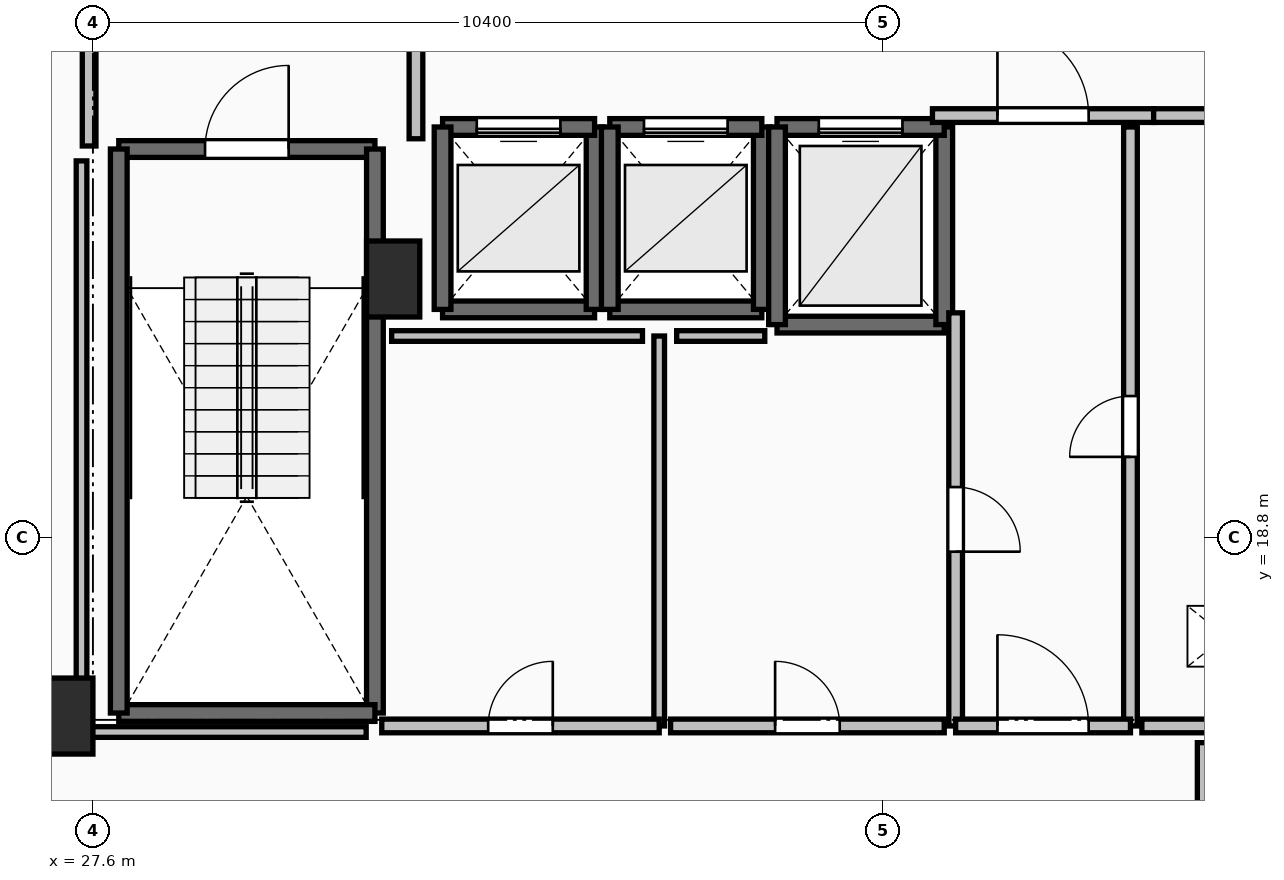
"""IFC4 building model, lengths in metres.
Left out: names, types, materials, properties, quantities, classifications, styles, units other than length and angle.
Written with IfcOpenShell. Run it as: python <this file> out.ifc"""

import sys

from ifc_helpers import new_model, si_unit, direction, frame, frame_2d, origin, origin_2d, place, context, subcontext, project, spatial, rectangle, extrude, element, fill, save


model = new_model("IFC4")
c1 = context("Model", 3, precision=1e-05, world=origin(), true_north=direction((0.0, 1.0)))
c2 = subcontext(c1, "Body", "Model", "MODEL_VIEW")
j1 = project(units=[si_unit("LENGTHUNIT", "METRE"), si_unit("PLANEANGLEUNIT", "RADIAN")], contexts=[c1])
p1 = place(None, origin())
s1 = spatial("IfcSite", under=j1, at=p1, CompositionType="ELEMENT")
p2 = place(p1, origin())
s2 = spatial("IfcBuilding", under=s1, at=p2, CompositionType="ELEMENT")
p3 = place(p2, frame((0.0, 0.0, 200.1)))
s3 = spatial("IfcBuildingStorey", under=s2, at=p3, CompositionType="ELEMENT", Elevation=200.1)
for number, where, z_axis, x_axis in (
    (1, (27.25, 16.45, 0.0), (0.0, 0.0, 1.0), (1.0, 0.0, 0.0)),
    (2, (31.55, 22.2, 0.0), (0.0, 0.0, 1.0), (1.0, 0.0, 0.0)),
):
    element("IfcColumn", number, at=place(p3, frame(where, z_axis=z_axis, x_axis=x_axis)), inside=s3, PredefinedType="PILASTER", context=c2, shape_type="SweptSolid", body=[
        extrude(rectangle(XDim=0.7, YDim=1.0, at=origin_2d()), origin(), (0.0, 0.0, 1.0), 3.55),
    ])
p4 = place(p3, frame((27.94, 23.91, 0.0), z_axis=(0.0, 0.0, 1.0), x_axis=(1.0, 0.0, 0.0)))
e3 = element("IfcWall", 3, at=p4, inside=s3, PredefinedType="SOLIDWALL", context=c2, shape_type="SweptSolid", body=[
    extrude(rectangle(XDim=3.37, YDim=0.22, at=frame_2d((1.685, 0.0))), origin(), (0.0, 0.0, 1.0), 3.29),
])
p5 = place(p4, frame((1.135, 0.0, 0.0)))
e4 = element("IfcOpeningElement", 4, at=p5, cuts=e3, PredefinedType="OPENING", context=c2, shape_type="SweptSolid", body=[
    extrude(rectangle(XDim=1.1, YDim=2.15, at=frame_2d((0.55, 1.075))), frame((0.0, 0.125, 0.0), z_axis=(0.0, -1.0, 0.0), x_axis=(1.0, 0.0, 0.0)), (0.0, 0.0, 1.0), 0.25),
])
p6 = place(p3, frame((31.31, 23.91, 0.0), z_axis=(0.0, 0.0, 1.0), x_axis=(0.0, -1.0, 0.0)))
e5 = element("IfcWall", 5, at=p6, inside=s3, PredefinedType="SOLIDWALL", context=c2, shape_type="SweptSolid", body=[
    extrude(rectangle(XDim=7.42, YDim=0.22, at=frame_2d((3.71, 0.0))), origin(), (0.0, 0.0, 1.0), 3.29),
])
p7 = place(p3, frame((31.31, 16.49, 0.0), z_axis=(0.0, 0.0, 1.0), x_axis=(-1.0, 0.0, 0.0)))
e6 = element("IfcWall", 6, at=p7, inside=s3, PredefinedType="SOLIDWALL", context=c2, shape_type="SweptSolid", body=[
    extrude(rectangle(XDim=3.37, YDim=0.22, at=frame_2d((1.685, 0.0))), origin(), (0.0, 0.0, 1.0), 3.29),
])
p8 = place(p3, frame((27.94, 16.49, 0.0), z_axis=(0.0, 0.0, 1.0), x_axis=(0.0, 1.0, 0.0)))
e7 = element("IfcWall", 7, at=p8, inside=s3, PredefinedType="SOLIDWALL", context=c2, shape_type="SweptSolid", body=[
    extrude(rectangle(XDim=7.42, YDim=0.22, at=frame_2d((3.71, 0.0))), origin(), (0.0, 0.0, 1.0), 3.29),
])
p9 = place(p3, frame((32.2, 21.8, 0.0), z_axis=(0.0, 0.0, 1.0), x_axis=(1.0, 0.0, 0.0)))
e8 = element("IfcWall", 8, at=p9, inside=s3, PredefinedType="SOLIDWALL", context=c2, shape_type="SweptSolid", body=[
    extrude(rectangle(XDim=2.0, YDim=0.22, at=frame_2d((1.0, 0.0))), origin(), (0.0, 0.0, 1.0), 3.29),
])
p10 = place(p3, frame((34.2, 21.8, 0.0), z_axis=(0.0, 0.0, 1.0), x_axis=(0.0, 1.0, 0.0)))
e9 = element("IfcWall", 9, at=p10, inside=s3, PredefinedType="SOLIDWALL", context=c2, shape_type="SweptSolid", body=[
    extrude(rectangle(XDim=2.4, YDim=0.22, at=frame_2d((1.2, 0.0))), origin(), (0.0, 0.0, 1.0), 3.29),
])
p11 = place(p3, frame((34.2, 24.2, 0.0), z_axis=(0.0, 0.0, 1.0), x_axis=(-1.0, 0.0, 0.0)))
e10 = element("IfcWall", 10, at=p11, inside=s3, PredefinedType="SOLIDWALL", context=c2, shape_type="SweptSolid", body=[
    extrude(rectangle(XDim=2.0, YDim=0.22, at=frame_2d((1.0, 0.0))), origin(), (0.0, 0.0, 1.0), 3.29),
])
p12 = place(p11, frame((0.45, 0.0, 0.0)))
e11 = element("IfcOpeningElement", 11, at=p12, cuts=e10, PredefinedType="OPENING", context=c2, shape_type="SweptSolid", body=[
    extrude(rectangle(XDim=1.1, YDim=2.2, at=frame_2d((0.55, 1.1))), frame((0.0, 0.125, 0.0), z_axis=(0.0, -1.0, 0.0), x_axis=(1.0, 0.0, 0.0)), (0.0, 0.0, 1.0), 0.25),
])
p13 = place(p3, frame((32.2, 24.2, 0.0), z_axis=(0.0, 0.0, 1.0), x_axis=(0.0, -1.0, 0.0)))
e12 = element("IfcWall", 12, at=p13, inside=s3, PredefinedType="SOLIDWALL", context=c2, shape_type="SweptSolid", body=[
    extrude(rectangle(XDim=2.4, YDim=0.22, at=frame_2d((1.2, 0.0))), origin(), (0.0, 0.0, 1.0), 3.29),
])
p14 = place(p3, frame((34.4, 21.8, 0.0), z_axis=(0.0, 0.0, 1.0), x_axis=(1.0, 0.0, 0.0)))
e13 = element("IfcWall", 13, at=p14, inside=s3, PredefinedType="SOLIDWALL", context=c2, shape_type="SweptSolid", body=[
    extrude(rectangle(XDim=2.0, YDim=0.22, at=frame_2d((1.0, 0.0))), origin(), (0.0, 0.0, 1.0), 3.29),
])
p15 = place(p3, frame((36.4, 21.8, 0.0), z_axis=(0.0, 0.0, 1.0), x_axis=(0.0, 1.0, 0.0)))
e14 = element("IfcWall", 14, at=p15, inside=s3, PredefinedType="SOLIDWALL", context=c2, shape_type="SweptSolid", body=[
    extrude(rectangle(XDim=2.4, YDim=0.22, at=frame_2d((1.2, 0.0))), origin(), (0.0, 0.0, 1.0), 3.29),
])
p16 = place(p3, frame((36.4, 24.2, 0.0), z_axis=(0.0, 0.0, 1.0), x_axis=(-1.0, 0.0, 0.0)))
e15 = element("IfcWall", 15, at=p16, inside=s3, PredefinedType="SOLIDWALL", context=c2, shape_type="SweptSolid", body=[
    extrude(rectangle(XDim=2.0, YDim=0.22, at=frame_2d((1.0, 0.0))), origin(), (0.0, 0.0, 1.0), 3.29),
])
p17 = place(p16, frame((0.45, 0.0, 0.0)))
e16 = element("IfcOpeningElement", 16, at=p17, cuts=e15, PredefinedType="OPENING", context=c2, shape_type="SweptSolid", body=[
    extrude(rectangle(XDim=1.1, YDim=2.2, at=frame_2d((0.55, 1.1))), frame((0.0, 0.125, 0.0), z_axis=(0.0, -1.0, 0.0), x_axis=(1.0, 0.0, 0.0)), (0.0, 0.0, 1.0), 0.25),
])
p18 = place(p3, frame((34.4, 24.2, 0.0), z_axis=(0.0, 0.0, 1.0), x_axis=(0.0, -1.0, 0.0)))
e17 = element("IfcWall", 17, at=p18, inside=s3, PredefinedType="SOLIDWALL", context=c2, shape_type="SweptSolid", body=[
    extrude(rectangle(XDim=2.4, YDim=0.22, at=frame_2d((1.2, 0.0))), origin(), (0.0, 0.0, 1.0), 3.29),
])
p19 = place(p3, frame((36.6, 21.6, 0.0), z_axis=(0.0, 0.0, 1.0), x_axis=(1.0, 0.0, 0.0)))
e18 = element("IfcWall", 18, at=p19, inside=s3, PredefinedType="SOLIDWALL", context=c2, shape_type="SweptSolid", body=[
    extrude(rectangle(XDim=2.2, YDim=0.22, at=frame_2d((1.1, 0.0))), origin(), (0.0, 0.0, 1.0), 3.29),
])
p20 = place(p3, frame((38.8, 21.6, 0.0), z_axis=(0.0, 0.0, 1.0), x_axis=(0.0, 1.0, 0.0)))
e19 = element("IfcWall", 19, at=p20, inside=s3, PredefinedType="SOLIDWALL", context=c2, shape_type="SweptSolid", body=[
    extrude(rectangle(XDim=2.6, YDim=0.22, at=frame_2d((1.3, 0.0))), origin(), (0.0, 0.0, 1.0), 3.29),
])
p21 = place(p3, frame((38.8, 24.2, 0.0), z_axis=(0.0, 0.0, 1.0), x_axis=(-1.0, 0.0, 0.0)))
e20 = element("IfcWall", 20, at=p21, inside=s3, PredefinedType="SOLIDWALL", context=c2, shape_type="SweptSolid", body=[
    extrude(rectangle(XDim=2.2, YDim=0.22, at=frame_2d((1.1, 0.0))), origin(), (0.0, 0.0, 1.0), 3.29),
])
p22 = place(p21, frame((0.55, 0.0, 0.0)))
e21 = element("IfcOpeningElement", 21, at=p22, cuts=e20, PredefinedType="OPENING", context=c2, shape_type="SweptSolid", body=[
    extrude(rectangle(XDim=1.1, YDim=2.2, at=frame_2d((0.55, 1.1))), frame((0.0, 0.125, 0.0), z_axis=(0.0, -1.0, 0.0), x_axis=(1.0, 0.0, 0.0)), (0.0, 0.0, 1.0), 0.25),
])
p23 = place(p3, frame((36.6, 24.2, 0.0), z_axis=(0.0, 0.0, 1.0), x_axis=(0.0, -1.0, 0.0)))
e22 = element("IfcWall", 22, at=p23, inside=s3, PredefinedType="SOLIDWALL", context=c2, shape_type="SweptSolid", body=[
    extrude(rectangle(XDim=2.6, YDim=0.22, at=frame_2d((1.3, 0.0))), origin(), (0.0, 0.0, 1.0), 3.29),
])
p24 = place(p3, frame((31.85, 24.045, 0.0), z_axis=(0.0, 0.0, 1.0), x_axis=(0.0, 1.0, 0.0)))
e23 = element("IfcWall", 23, at=p24, inside=s3, PredefinedType="PARTITIONING", context=c2, shape_type="SweptSolid", body=[
    extrude(rectangle(XDim=3.91, YDim=0.18, at=frame_2d((1.955, 0.0))), origin(), (0.0, 0.0, 1.0), 3.29),
])
p25 = place(p24, frame((1.355, 0.0, 0.0)))
e24 = element("IfcOpeningElement", 24, at=p25, cuts=e23, PredefinedType="OPENING", context=c2, shape_type="SweptSolid", body=[
    extrude(rectangle(XDim=1.2, YDim=2.15, at=frame_2d((0.6, 1.075))), frame((0.0, 0.105, 0.0), z_axis=(0.0, -1.0, 0.0), x_axis=(1.0, 0.0, 0.0)), (0.0, 0.0, 1.0), 0.21),
])
p26 = place(p3, frame((27.55, 28.0, 0.0), z_axis=(0.0, 0.0, 1.0), x_axis=(0.0, -1.0, 0.0)))
e25 = element("IfcWall", 25, at=p26, inside=s3, PredefinedType="PARTITIONING", context=c2, shape_type="SweptSolid", body=[
    extrude(rectangle(XDim=4.05, YDim=0.18, at=frame_2d((2.025, 0.0))), origin(), (0.0, 0.0, 1.0), 3.29),
])
p27 = place(p26, frame((1.425, 0.0, 0.0)))
e26 = element("IfcOpeningElement", 26, at=p27, cuts=e25, PredefinedType="OPENING", context=c2, shape_type="SweptSolid", body=[
    extrude(rectangle(XDim=1.2, YDim=2.15, at=frame_2d((0.6, 1.075))), frame((0.0, 0.105, 0.0), z_axis=(0.0, -1.0, 0.0), x_axis=(1.0, 0.0, 0.0)), (0.0, 0.0, 1.0), 0.21),
])
p28 = place(p3, frame((38.645, 24.35, 0.0), z_axis=(0.0, 0.0, 1.0), x_axis=(1.0, 0.0, 0.0)))
e27 = element("IfcWall", 27, at=p28, inside=s3, PredefinedType="PARTITIONING", context=c2, shape_type="SweptSolid", body=[
    extrude(rectangle(XDim=2.91, YDim=0.18, at=frame_2d((1.455, 0.0))), origin(), (0.0, 0.0, 1.0), 3.29),
])
p29 = place(p28, frame((0.855, 0.0, 0.0)))
e28 = element("IfcOpeningElement", 28, at=p29, cuts=e27, PredefinedType="OPENING", context=c2, shape_type="SweptSolid", body=[
    extrude(rectangle(XDim=1.2, YDim=2.15, at=frame_2d((0.6, 1.075))), frame((0.0, 0.105, 0.0), z_axis=(0.0, -1.0, 0.0), x_axis=(1.0, 0.0, 0.0)), (0.0, 0.0, 1.0), 0.21),
])
p30 = place(p3, frame((41.555, 24.35, 0.0), z_axis=(0.0, 0.0, 1.0), x_axis=(1.0, 0.0, 0.0)))
e29 = element("IfcWall", 29, at=p30, inside=s3, PredefinedType="PARTITIONING", context=c2, shape_type="SweptSolid", body=[
    extrude(rectangle(XDim=2.445, YDim=0.18, at=frame_2d((1.223, 0.0))), origin(), (0.0, 0.0, 1.0), 3.29),
])
p31 = place(p30, frame((0.823, 0.0, 0.0)))
e30 = element("IfcOpeningElement", 30, at=p31, cuts=e29, PredefinedType="OPENING", context=c2, shape_type="SweptSolid", body=[
    extrude(rectangle(XDim=0.8, YDim=2.05, at=frame_2d((0.4, 1.025))), frame((0.0, 0.105, 0.0), z_axis=(0.0, -1.0, 0.0), x_axis=(1.0, 0.0, 0.0)), (0.0, 0.0, 1.0), 0.21),
])
p32 = place(p3, frame((41.25, 16.32, 0.0), z_axis=(0.0, 0.0, 1.0), x_axis=(0.0, 1.0, 0.0)))
e31 = element("IfcWall", 31, at=p32, inside=s3, PredefinedType="PARTITIONING", context=c2, shape_type="SweptSolid", body=[
    extrude(rectangle(XDim=7.88, YDim=0.18, at=frame_2d((3.94, 0.0))), origin(), (0.0, 0.0, 1.0), 3.29),
])
p33 = place(p32, frame((3.54, 0.0, 0.0)))
e32 = element("IfcOpeningElement", 32, at=p33, cuts=e31, PredefinedType="OPENING", context=c2, shape_type="SweptSolid", body=[
    extrude(rectangle(XDim=0.8, YDim=2.05, at=frame_2d((0.4, 1.025))), frame((0.0, 0.105, 0.0), z_axis=(0.0, -1.0, 0.0), x_axis=(1.0, 0.0, 0.0)), (0.0, 0.0, 1.0), 0.21),
])
p34 = place(p3, frame((38.95, 21.755, 0.0), z_axis=(0.0, 0.0, 1.0), x_axis=(0.0, -1.0, 0.0)))
e33 = element("IfcWall", 33, at=p34, inside=s3, PredefinedType="PARTITIONING", context=c2, shape_type="SweptSolid", body=[
    extrude(rectangle(XDim=5.435, YDim=0.18, at=frame_2d((2.717, 0.0))), origin(), (0.0, 0.0, 1.0), 3.29),
])
p35 = place(p34, frame((2.292, 0.0, 0.0)))
e34 = element("IfcOpeningElement", 34, at=p35, cuts=e33, PredefinedType="OPENING", context=c2, shape_type="SweptSolid", body=[
    extrude(rectangle(XDim=0.85, YDim=2.1, at=frame_2d((0.425, 1.05))), frame((0.0, 0.105, 0.0), z_axis=(0.0, -1.0, 0.0), x_axis=(1.0, 0.0, 0.0)), (0.0, 0.0, 1.0), 0.21),
])
p36 = place(p3, frame((38.95, 16.32, 0.0), z_axis=(0.0, 0.0, 1.0), x_axis=(1.0, 0.0, 0.0)))
e35 = element("IfcWall", 35, at=p36, inside=s3, PredefinedType="PARTITIONING", context=c2, shape_type="SweptSolid", body=[
    extrude(rectangle(XDim=2.3, YDim=0.18, at=frame_2d((1.15, 0.0))), origin(), (0.0, 0.0, 1.0), 3.29),
])
p37 = place(p36, frame((0.55, 0.0, 0.0)))
e36 = element("IfcOpeningElement", 36, at=p37, cuts=e35, PredefinedType="OPENING", context=c2, shape_type="SweptSolid", body=[
    extrude(rectangle(XDim=1.2, YDim=2.15, at=frame_2d((0.6, 1.075))), frame((0.0, 0.105, 0.0), z_axis=(0.0, -1.0, 0.0), x_axis=(1.0, 0.0, 0.0)), (0.0, 0.0, 1.0), 0.21),
])
p38 = place(p3, frame((41.4, 16.32, 0.0), z_axis=(0.0, 0.0, 1.0), x_axis=(1.0, 0.0, 0.0)))
e37 = element("IfcWall", 37, at=p38, inside=s3, PredefinedType="PARTITIONING", context=c2, shape_type="SweptSolid", body=[
    extrude(rectangle(XDim=3.2, YDim=0.18, at=frame_2d((1.6, 0.0))), origin(), (0.0, 0.0, 1.0), 3.29),
])
p39 = place(p38, frame((1.2, 0.0, 0.0)))
e38 = element("IfcOpeningElement", 38, at=p39, cuts=e37, PredefinedType="OPENING", context=c2, shape_type="SweptSolid", body=[
    extrude(rectangle(XDim=0.8, YDim=2.05, at=frame_2d((0.4, 1.025))), frame((0.0, 0.105, 0.0), z_axis=(0.0, -1.0, 0.0), x_axis=(1.0, 0.0, 0.0)), (0.0, 0.0, 1.0), 0.21),
])
p40 = place(p3, frame((35.05, 16.32, 0.0), z_axis=(0.0, 0.0, 1.0), x_axis=(0.0, 1.0, 0.0)))
e39 = element("IfcWall", 39, at=p40, inside=s3, PredefinedType="PARTITIONING", context=c2, shape_type="SweptSolid", body=[
    extrude(rectangle(XDim=5.13, YDim=0.14, at=frame_2d((2.565, 0.0))), origin(), (0.0, 0.0, 1.0), 3.29),
])
p41 = place(p3, frame((31.4, 16.32, 0.0), z_axis=(0.0, 0.0, 1.0), x_axis=(1.0, 0.0, 0.0)))
e40 = element("IfcWall", 40, at=p41, inside=s3, PredefinedType="PARTITIONING", context=c2, shape_type="SweptSolid", body=[
    extrude(rectangle(XDim=3.65, YDim=0.18, at=frame_2d((1.825, 0.0))), origin(), (0.0, 0.0, 1.0), 3.29),
])
p42 = place(p41, frame((1.4, 0.0, 0.0)))
e41 = element("IfcOpeningElement", 41, at=p42, cuts=e40, PredefinedType="OPENING", context=c2, shape_type="SweptSolid", body=[
    extrude(rectangle(XDim=0.85, YDim=2.1, at=frame_2d((0.425, 1.05))), frame((0.0, 0.105, 0.0), z_axis=(0.0, -1.0, 0.0), x_axis=(1.0, 0.0, 0.0)), (0.0, 0.0, 1.0), 0.21),
])
p43 = place(p3, frame((35.2, 16.32, 0.0), z_axis=(0.0, 0.0, 1.0), x_axis=(1.0, 0.0, 0.0)))
e42 = element("IfcWall", 42, at=p43, inside=s3, PredefinedType="PARTITIONING", context=c2, shape_type="SweptSolid", body=[
    extrude(rectangle(XDim=3.6, YDim=0.18, at=frame_2d((1.8, 0.0))), origin(), (0.0, 0.0, 1.0), 3.29),
])
p44 = place(p43, frame((1.375, 0.0, 0.0)))
e43 = element("IfcOpeningElement", 43, at=p44, cuts=e42, PredefinedType="OPENING", context=c2, shape_type="SweptSolid", body=[
    extrude(rectangle(XDim=0.85, YDim=2.1, at=frame_2d((0.425, 1.05))), frame((0.0, 0.105, 0.0), z_axis=(0.0, -1.0, 0.0), x_axis=(1.0, 0.0, 0.0)), (0.0, 0.0, 1.0), 0.21),
])
p45 = place(p3, frame((34.83, 21.45, 0.0), z_axis=(0.0, 0.0, 1.0), x_axis=(-1.0, 0.0, 0.0)))
e44 = element("IfcWall", 44, at=p45, inside=s3, PredefinedType="PARTITIONING", context=c2, shape_type="SweptSolid", body=[
    extrude(rectangle(XDim=3.3, YDim=0.14, at=frame_2d((1.65, 0.0))), origin(), (0.0, 0.0, 1.0), 3.29),
])
p46 = place(p3, frame((36.439, 21.45, 0.0), z_axis=(0.0, 0.0, 1.0), x_axis=(-1.0, 0.0, 0.0)))
e45 = element("IfcWall", 45, at=p46, inside=s3, PredefinedType="PARTITIONING", context=c2, shape_type="SweptSolid", body=[
    extrude(rectangle(XDim=1.159, YDim=0.14, at=frame_2d((0.58, 0.0))), origin(), (0.0, 0.0, 1.0), 3.29),
])
p47 = place(p3, frame((27.45, 23.754, 0.0), z_axis=(0.0, 0.0, 1.0), x_axis=(0.0, -1.0, 0.0)))
e46 = element("IfcWall", 46, at=p47, inside=s3, PredefinedType="PARTITIONING", context=c2, shape_type="SweptSolid", body=[
    extrude(rectangle(XDim=7.514, YDim=0.14, at=frame_2d((3.757, 0.0))), origin(), (0.0, 0.0, 1.0), 2.482),
])
p48 = place(p3, frame((27.45, 16.24, 0.0), z_axis=(0.0, 0.0, 1.0), x_axis=(1.0, 0.0, 0.0)))
e47 = element("IfcWall", 47, at=p48, inside=s3, PredefinedType="PARTITIONING", context=c2, shape_type="SweptSolid", body=[
    extrude(rectangle(XDim=3.745, YDim=0.14, at=frame_2d((1.873, 0.0))), origin(), (0.0, 0.0, 1.0), 2.482),
])
p49 = place(p3, frame((42.2, 16.1, 0.0), z_axis=(0.0, 0.0, 1.0), x_axis=(0.0, -1.0, 0.0)))
e48 = element("IfcWall", 48, at=p49, inside=s3, PredefinedType="PARTITIONING", context=c2, shape_type="SweptSolid", body=[
    extrude(rectangle(XDim=1.83, YDim=0.14, at=frame_2d((0.915, 0.0))), origin(), (0.0, 0.0, 1.0), 3.29),
])
p50 = place(p5, origin())
e49 = element("IfcDoor", 49, at=p50, inside=s3, OperationType="SINGLE_SWING_RIGHT", PredefinedType="DOOR", context=c2, shape_type="SweptSolid", body=[
    extrude(rectangle(XDim=1.1, YDim=2.15, at=frame_2d((0.55, 1.075))), frame((0.0, 0.025, 0.0), z_axis=(0.0, -1.0, 0.0), x_axis=(1.0, 0.0, 0.0)), (0.0, 0.0, 1.0), 0.05),
])
fill(e4, e49)
p51 = place(p12, origin())
e50 = element("IfcDoor", 50, at=p51, inside=s3, OperationType="SLIDING_TO_LEFT", PredefinedType="DOOR", context=c2, shape_type="SweptSolid", body=[
    extrude(rectangle(XDim=1.1, YDim=2.2, at=frame_2d((0.55, 1.1))), frame((0.0, 0.025, 0.0), z_axis=(0.0, -1.0, 0.0), x_axis=(1.0, 0.0, 0.0)), (0.0, 0.0, 1.0), 0.05),
])
fill(e11, e50)
p52 = place(p17, origin())
e51 = element("IfcDoor", 51, at=p52, inside=s3, OperationType="SLIDING_TO_LEFT", PredefinedType="DOOR", context=c2, shape_type="SweptSolid", body=[
    extrude(rectangle(XDim=1.1, YDim=2.2, at=frame_2d((0.55, 1.1))), frame((0.0, 0.025, 0.0), z_axis=(0.0, -1.0, 0.0), x_axis=(1.0, 0.0, 0.0)), (0.0, 0.0, 1.0), 0.05),
])
fill(e16, e51)
p53 = place(p22, origin())
e52 = element("IfcDoor", 52, at=p53, inside=s3, OperationType="SLIDING_TO_LEFT", PredefinedType="DOOR", context=c2, shape_type="SweptSolid", body=[
    extrude(rectangle(XDim=1.1, YDim=2.2, at=frame_2d((0.55, 1.1))), frame((0.0, 0.025, 0.0), z_axis=(0.0, -1.0, 0.0), x_axis=(1.0, 0.0, 0.0)), (0.0, 0.0, 1.0), 0.05),
])
fill(e21, e52)
p54 = place(p29, origin())
e53 = element("IfcDoor", 53, at=p54, inside=s3, OperationType="SINGLE_SWING_LEFT", PredefinedType="DOOR", context=c2, shape_type="SweptSolid", body=[
    extrude(rectangle(XDim=1.2, YDim=2.15, at=frame_2d((0.6, 1.075))), frame((0.0, 0.025, 0.0), z_axis=(0.0, -1.0, 0.0), x_axis=(1.0, 0.0, 0.0)), (0.0, 0.0, 1.0), 0.05),
])
fill(e28, e53)
p55 = place(p33, origin())
e54 = element("IfcDoor", 54, at=p55, inside=s3, OperationType="SINGLE_SWING_LEFT", PredefinedType="DOOR", context=c2, shape_type="SweptSolid", body=[
    extrude(rectangle(XDim=0.8, YDim=2.05, at=frame_2d((0.4, 1.025))), frame((0.0, 0.025, 0.0), z_axis=(0.0, -1.0, 0.0), x_axis=(1.0, 0.0, 0.0)), (0.0, 0.0, 1.0), 0.05),
])
fill(e32, e54)
p56 = place(p35, origin())
e55 = element("IfcDoor", 55, at=p56, inside=s3, OperationType="SINGLE_SWING_RIGHT", PredefinedType="DOOR", context=c2, shape_type="SweptSolid", body=[
    extrude(rectangle(XDim=0.85, YDim=2.1, at=frame_2d((0.425, 1.05))), frame((0.0, 0.025, 0.0), z_axis=(0.0, -1.0, 0.0), x_axis=(1.0, 0.0, 0.0)), (0.0, 0.0, 1.0), 0.05),
])
fill(e34, e55)
p57 = place(p37, origin())
e56 = element("IfcDoor", 56, at=p57, inside=s3, OperationType="SINGLE_SWING_LEFT", PredefinedType="DOOR", context=c2, shape_type="SweptSolid", body=[
    extrude(rectangle(XDim=1.2, YDim=2.15, at=frame_2d((0.6, 1.075))), frame((0.0, 0.025, 0.0), z_axis=(0.0, -1.0, 0.0), x_axis=(1.0, 0.0, 0.0)), (0.0, 0.0, 1.0), 0.05),
])
fill(e36, e56)
p58 = place(p42, origin())
e57 = element("IfcDoor", 57, at=p58, inside=s3, OperationType="SINGLE_SWING_RIGHT", PredefinedType="DOOR", context=c2, shape_type="SweptSolid", body=[
    extrude(rectangle(XDim=0.85, YDim=2.1, at=frame_2d((0.425, 1.05))), frame((0.0, 0.025, 0.0), z_axis=(0.0, -1.0, 0.0), x_axis=(1.0, 0.0, 0.0)), (0.0, 0.0, 1.0), 0.05),
])
fill(e41, e57)
p59 = place(p44, origin())
e58 = element("IfcDoor", 58, at=p59, inside=s3, OperationType="SINGLE_SWING_LEFT", PredefinedType="DOOR", context=c2, shape_type="SweptSolid", body=[
    extrude(rectangle(XDim=0.85, YDim=2.1, at=frame_2d((0.425, 1.05))), frame((0.0, 0.025, 0.0), z_axis=(0.0, -1.0, 0.0), x_axis=(1.0, 0.0, 0.0)), (0.0, 0.0, 1.0), 0.05),
])
fill(e43, e58)
save(model, sys.argv[1])
